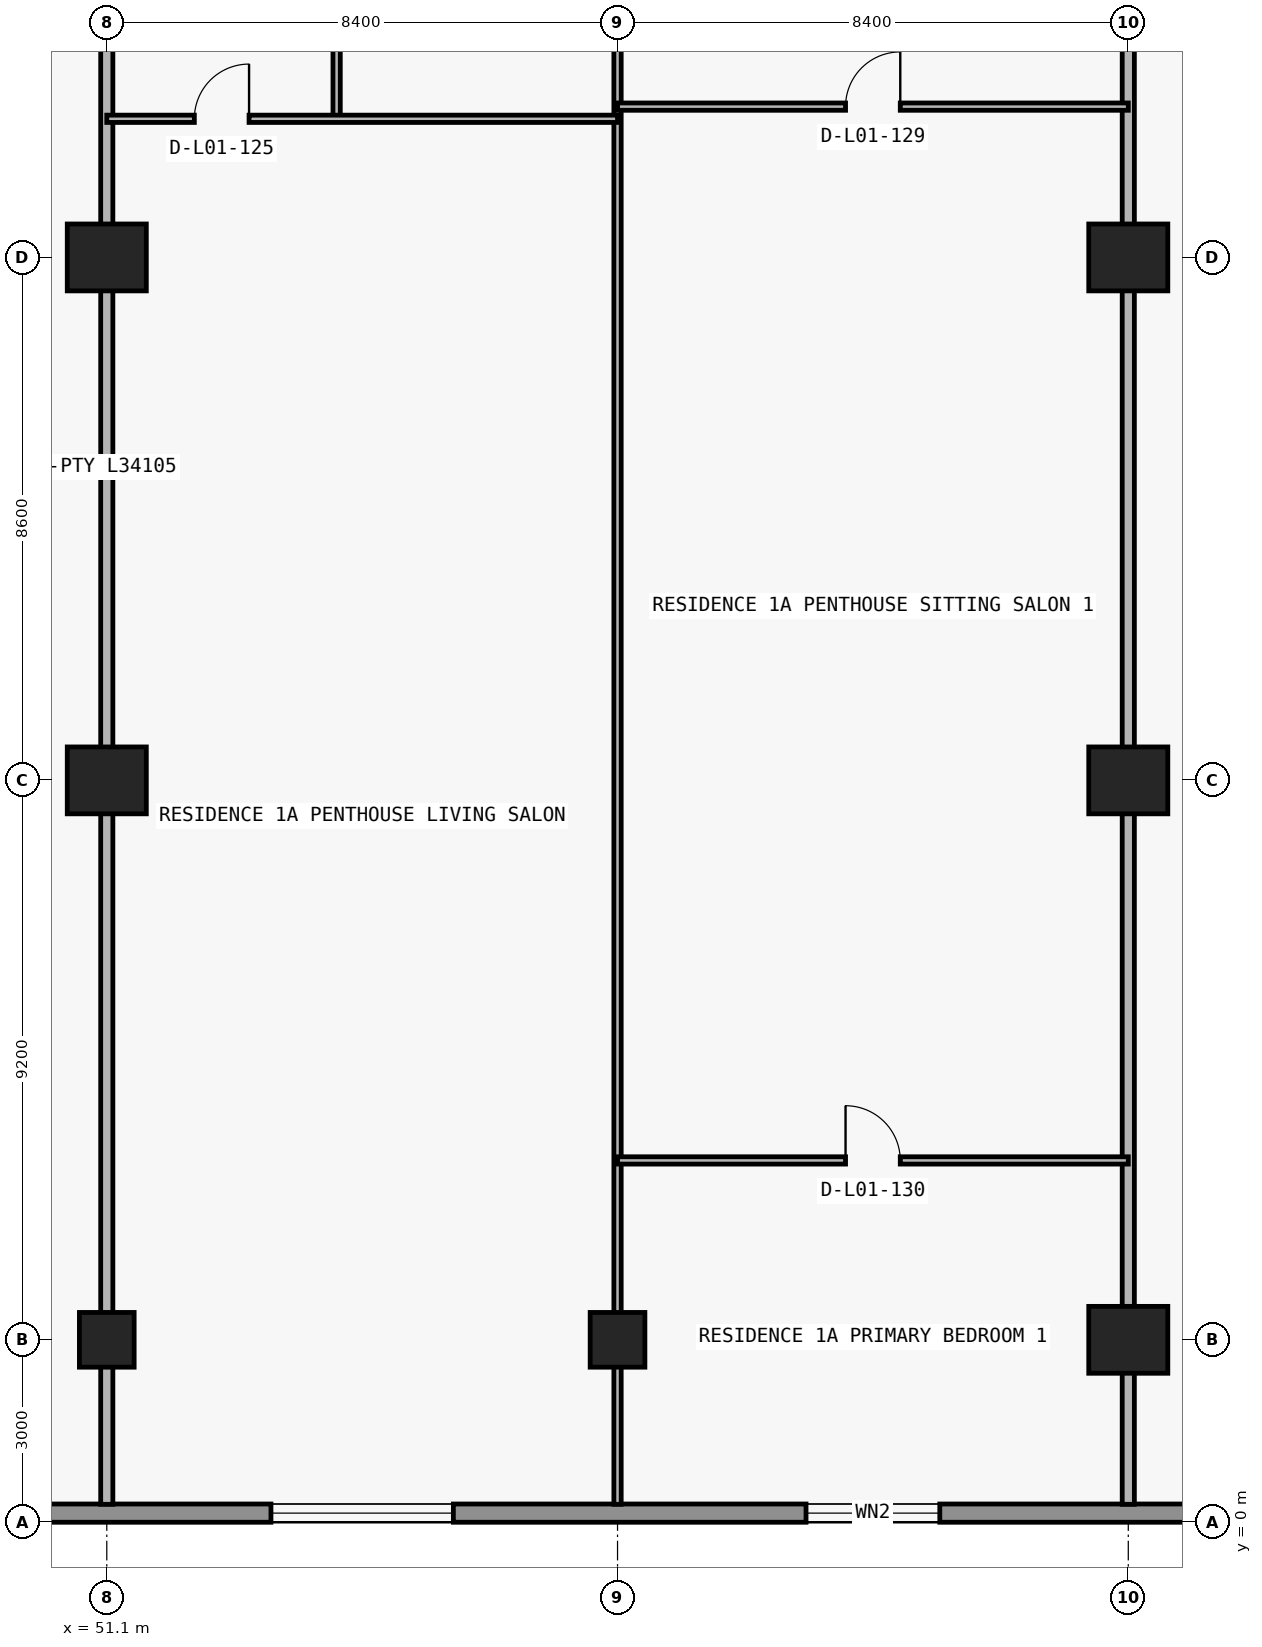
"""IFC4 building model, lengths in metres.
Left out: names, types, materials, properties, quantities, classifications, styles, units other than length and angle.
Written with IfcOpenShell. Run it as: python <this file> out.ifc"""

import sys

from ifc_helpers import new_model, si_unit, direction, frame, frame_2d, origin, origin_2d, place, context, subcontext, project, spatial, rectangle, circle, extrude, element, fill, save


model = new_model("IFC4")
c1 = context("Model", 3, precision=1e-05, world=origin(), true_north=direction((0.0, 1.0)))
c2 = subcontext(c1, "Body", "Model", "MODEL_VIEW")
j1 = project(units=[si_unit("LENGTHUNIT", "METRE"), si_unit("PLANEANGLEUNIT", "RADIAN")], contexts=[c1])
p1 = place(None, origin())
s1 = spatial("IfcSite", under=j1, at=p1, CompositionType="ELEMENT")
p2 = place(p1, origin())
s2 = spatial("IfcBuilding", under=s1, at=p2, CompositionType="ELEMENT")
p3 = place(p2, frame((0.0, 0.0, 5.4)))
s3 = spatial("IfcBuildingStorey", under=s2, at=p3, CompositionType="ELEMENT", Elevation=5.4)
for number, where, z_axis, x_axis in (
    (1, (51.1, 3.0, 0.0), (0.0, 0.0, 1.0), (1.0, 0.0, 0.0)),
    (2, (59.5, 3.0, 0.0), (0.0, 0.0, 1.0), (1.0, 0.0, 0.0)),
):
    element("IfcColumn", number, at=place(p3, frame(where, z_axis=z_axis, x_axis=x_axis)), inside=s3, PredefinedType="COLUMN", context=c2, shape_type="SweptSolid", body=[
        extrude(circle(Radius=0.45, at=origin_2d()), origin(), (0.0, 0.0, 1.0), 4.5),
    ])
for number, where, z_axis, x_axis in (
    (3, (67.9, 3.0, 0.0), (0.0, 0.0, 1.0), (1.0, 0.0, 0.0)),
    (4, (51.1, 12.2, 0.0), (0.0, 0.0, 1.0), (1.0, 0.0, 0.0)),
    (5, (67.9, 12.2, 0.0), (0.0, 0.0, 1.0), (1.0, 0.0, 0.0)),
    (6, (51.1, 20.8, 0.0), (0.0, 0.0, 1.0), (1.0, 0.0, 0.0)),
    (7, (67.9, 20.8, 0.0), (0.0, 0.0, 1.0), (1.0, 0.0, 0.0)),
):
    element("IfcColumn", number, at=place(p3, frame(where, z_axis=z_axis, x_axis=x_axis)), inside=s3, PredefinedType="COLUMN", context=c2, shape_type="SweptSolid", body=[
        extrude(rectangle(XDim=1.3, YDim=1.1, at=origin_2d()), origin(), (0.0, 0.0, 1.0), 4.5),
    ])
p4 = place(p3, frame((77.8, 0.15, 0.0), z_axis=(0.0, 0.0, 1.0), x_axis=(-1.0, 0.0, 0.0)))
e8 = element("IfcWall", 8, at=p4, inside=s3, PredefinedType="STANDARD", context=c2, shape_type="SweptSolid", body=[
    extrude(rectangle(XDim=77.8, YDim=0.3, at=frame_2d((38.9, 0.0))), origin(), (0.0, 0.0, 1.0), 4.5),
])
p5 = place(p4, frame((62.875, 0.0, 0.85)))
e9 = element("IfcOpeningElement", 9, at=p5, cuts=e8, PredefinedType="OPENING", context=c2, shape_type="SweptSolid", body=[
    extrude(rectangle(XDim=3.0, YDim=2.4, at=frame_2d((1.5, 1.2))), frame((0.0, 0.16, 0.0), z_axis=(0.0, -1.0, 0.0), x_axis=(1.0, 0.0, 0.0)), (0.0, 0.0, 1.0), 0.32),
])
p6 = place(p4, frame((37.4, 0.0, 0.85)))
e10 = element("IfcOpeningElement", 10, at=p6, cuts=e8, PredefinedType="OPENING", context=c2, shape_type="SweptSolid", body=[
    extrude(rectangle(XDim=3.0, YDim=2.4, at=frame_2d((1.5, 1.2))), frame((0.0, 0.16, 0.0), z_axis=(0.0, -1.0, 0.0), x_axis=(1.0, 0.0, 0.0)), (0.0, 0.0, 1.0), 0.32),
])
p7 = place(p4, frame((21.0, 0.0, 0.85)))
e11 = element("IfcOpeningElement", 11, at=p7, cuts=e8, PredefinedType="OPENING", context=c2, shape_type="SweptSolid", body=[
    extrude(rectangle(XDim=3.0, YDim=2.4, at=frame_2d((1.5, 1.2))), frame((0.0, 0.16, 0.0), z_axis=(0.0, -1.0, 0.0), x_axis=(1.0, 0.0, 0.0)), (0.0, 0.0, 1.0), 0.32),
])
p8 = place(p4, frame((13.0, 0.0, 0.85)))
e12 = element("IfcOpeningElement", 12, at=p8, cuts=e8, PredefinedType="OPENING", context=c2, shape_type="SweptSolid", body=[
    extrude(rectangle(XDim=2.2, YDim=1.55, at=frame_2d((1.1, 0.775))), frame((0.0, 0.16, 0.0), z_axis=(0.0, -1.0, 0.0), x_axis=(1.0, 0.0, 0.0)), (0.0, 0.0, 1.0), 0.32),
])
p9 = place(p4, frame((3.525, 0.0, 0.85)))
e13 = element("IfcOpeningElement", 13, at=p9, cuts=e8, PredefinedType="OPENING", context=c2, shape_type="SweptSolid", body=[
    extrude(rectangle(XDim=3.0, YDim=2.4, at=frame_2d((1.5, 1.2))), frame((0.0, 0.16, 0.0), z_axis=(0.0, -1.0, 0.0), x_axis=(1.0, 0.0, 0.0)), (0.0, 0.0, 1.0), 0.32),
])
p10 = place(p3, frame((51.1, 0.295, 0.0), z_axis=(0.0, 0.0, 1.0), x_axis=(0.0, 1.0, 0.0)))
e14 = element("IfcWall", 14, at=p10, inside=s3, PredefinedType="PARTITIONING", context=c2, shape_type="SweptSolid", body=[
    extrude(rectangle(XDim=34.105, YDim=0.2, at=frame_2d((17.052, 0.0))), origin(), (0.0, 0.0, 1.0), 3.464),
])
p11 = place(p3, frame((54.88, 23.08, 0.0), z_axis=(0.0, 0.0, 1.0), x_axis=(0.0, 1.0, 0.0)))
e15 = element("IfcWall", 15, at=p11, inside=s3, PredefinedType="PARTITIONING", context=c2, shape_type="SweptSolid", body=[
    extrude(rectangle(XDim=4.8, YDim=0.12, at=frame_2d((2.4, 0.0))), origin(), (0.0, 0.0, 1.0), 4.5),
])
p12 = place(p11, frame((1.95, 0.0, 0.0)))
e16 = element("IfcOpeningElement", 16, at=p12, cuts=e15, PredefinedType="OPENING", context=c2, shape_type="SweptSolid", body=[
    extrude(rectangle(XDim=0.9, YDim=2.15, at=frame_2d((0.45, 1.075))), frame((0.0, 0.07, 0.0), z_axis=(0.0, -1.0, 0.0), x_axis=(1.0, 0.0, 0.0)), (0.0, 0.0, 1.0), 0.14),
])
p13 = place(p3, frame((59.5, 0.295, 0.0), z_axis=(0.0, 0.0, 1.0), x_axis=(0.0, 1.0, 0.0)))
e17 = element("IfcWall", 17, at=p13, inside=s3, PredefinedType="PARTITIONING", context=c2, shape_type="SweptSolid", body=[
    extrude(rectangle(XDim=34.105, YDim=0.12, at=frame_2d((17.052, 0.0))), origin(), (0.0, 0.0, 1.0), 4.5),
])
p14 = place(p13, frame((24.735, 0.0, 0.0)))
e18 = element("IfcOpeningElement", 18, at=p14, cuts=e17, PredefinedType="OPENING", context=c2, shape_type="SweptSolid", body=[
    extrude(rectangle(XDim=0.9, YDim=2.15, at=frame_2d((0.45, 1.075))), frame((0.0, 0.07, 0.0), z_axis=(0.0, -1.0, 0.0), x_axis=(1.0, 0.0, 0.0)), (0.0, 0.0, 1.0), 0.14),
])
p15 = place(p3, frame((67.9, 0.295, 0.0), z_axis=(0.0, 0.0, 1.0), x_axis=(0.0, 1.0, 0.0)))
e19 = element("IfcWall", 19, at=p15, inside=s3, PredefinedType="PARTITIONING", context=c2, shape_type="SweptSolid", body=[
    extrude(rectangle(XDim=34.105, YDim=0.2, at=frame_2d((17.052, 0.0))), origin(), (0.0, 0.0, 1.0), 3.464),
])
p16 = place(p3, frame((59.5, 5.95, 0.0), z_axis=(0.0, 0.0, 1.0), x_axis=(1.0, 0.0, 0.0)))
e20 = element("IfcWall", 20, at=p16, inside=s3, PredefinedType="PARTITIONING", context=c2, shape_type="SweptSolid", body=[
    extrude(rectangle(XDim=8.4, YDim=0.12, at=frame_2d((4.2, 0.0))), origin(), (0.0, 0.0, 1.0), 4.5),
])
p17 = place(p16, frame((3.75, 0.0, 0.0)))
e21 = element("IfcOpeningElement", 21, at=p17, cuts=e20, PredefinedType="OPENING", context=c2, shape_type="SweptSolid", body=[
    extrude(rectangle(XDim=0.9, YDim=2.15, at=frame_2d((0.45, 1.075))), frame((0.0, 0.07, 0.0), z_axis=(0.0, -1.0, 0.0), x_axis=(1.0, 0.0, 0.0)), (0.0, 0.0, 1.0), 0.14),
])
p18 = place(p3, frame((51.1, 23.08, 0.0), z_axis=(0.0, 0.0, 1.0), x_axis=(1.0, 0.0, 0.0)))
e22 = element("IfcWall", 22, at=p18, inside=s3, PredefinedType="PARTITIONING", context=c2, shape_type="SweptSolid", body=[
    extrude(rectangle(XDim=8.4, YDim=0.12, at=frame_2d((4.2, 0.0))), origin(), (0.0, 0.0, 1.0), 4.5),
])
p19 = place(p18, frame((1.44, 0.0, 0.0)))
e23 = element("IfcOpeningElement", 23, at=p19, cuts=e22, PredefinedType="OPENING", context=c2, shape_type="SweptSolid", body=[
    extrude(rectangle(XDim=0.9, YDim=2.15, at=frame_2d((0.45, 1.075))), frame((0.0, 0.07, 0.0), z_axis=(0.0, -1.0, 0.0), x_axis=(1.0, 0.0, 0.0)), (0.0, 0.0, 1.0), 0.14),
])
p20 = place(p3, frame((59.5, 23.28, 0.0), z_axis=(0.0, 0.0, 1.0), x_axis=(1.0, 0.0, 0.0)))
e24 = element("IfcWall", 24, at=p20, inside=s3, PredefinedType="PARTITIONING", context=c2, shape_type="SweptSolid", body=[
    extrude(rectangle(XDim=8.4, YDim=0.12, at=frame_2d((4.2, 0.0))), origin(), (0.0, 0.0, 1.0), 4.5),
])
p21 = place(p20, frame((3.75, 0.0, 0.0)))
e25 = element("IfcOpeningElement", 25, at=p21, cuts=e24, PredefinedType="OPENING", context=c2, shape_type="SweptSolid", body=[
    extrude(rectangle(XDim=0.9, YDim=2.15, at=frame_2d((0.45, 1.075))), frame((0.0, 0.07, 0.0), z_axis=(0.0, -1.0, 0.0), x_axis=(1.0, 0.0, 0.0)), (0.0, 0.0, 1.0), 0.14),
])
p22 = place(p7, origin())
e26 = element("IfcWindow", 26, at=p22, inside=s3, PartitioningType="SINGLE_PANEL", PredefinedType="WINDOW", context=c2, shape_type="SweptSolid", body=[
    extrude(rectangle(XDim=3.0, YDim=2.4, at=frame_2d((1.5, 1.2))), frame((0.0, 0.03, 0.0), z_axis=(0.0, -1.0, 0.0), x_axis=(1.0, 0.0, 0.0)), (0.0, 0.0, 1.0), 0.06),
])
fill(e11, e26)
p23 = place(p8, origin())
e27 = element("IfcWindow", 27, at=p23, inside=s3, PartitioningType="SINGLE_PANEL", PredefinedType="WINDOW", context=c2, shape_type="SweptSolid", body=[
    extrude(rectangle(XDim=2.2, YDim=1.55, at=frame_2d((1.1, 0.775))), frame((0.0, 0.03, 0.0), z_axis=(0.0, -1.0, 0.0), x_axis=(1.0, 0.0, 0.0)), (0.0, 0.0, 1.0), 0.06),
])
fill(e12, e27)
p24 = place(p19, origin())
e28 = element("IfcDoor", 28, at=p24, inside=s3, OperationType="SINGLE_SWING_RIGHT", PredefinedType="DOOR", context=c2, shape_type="SweptSolid", body=[
    extrude(rectangle(XDim=0.9, YDim=2.15, at=frame_2d((0.45, 1.075))), frame((0.0, 0.025, 0.0), z_axis=(0.0, -1.0, 0.0), x_axis=(1.0, 0.0, 0.0)), (0.0, 0.0, 1.0), 0.05),
])
fill(e23, e28)
p25 = place(p21, origin())
e29 = element("IfcDoor", 29, at=p25, inside=s3, OperationType="SINGLE_SWING_RIGHT", PredefinedType="DOOR", context=c2, shape_type="SweptSolid", body=[
    extrude(rectangle(XDim=0.9, YDim=2.15, at=frame_2d((0.45, 1.075))), frame((0.0, 0.025, 0.0), z_axis=(0.0, -1.0, 0.0), x_axis=(1.0, 0.0, 0.0)), (0.0, 0.0, 1.0), 0.05),
])
fill(e25, e29)
p26 = place(p17, origin())
e30 = element("IfcDoor", 30, at=p26, inside=s3, OperationType="SINGLE_SWING_LEFT", PredefinedType="DOOR", context=c2, shape_type="SweptSolid", body=[
    extrude(rectangle(XDim=0.9, YDim=2.15, at=frame_2d((0.45, 1.075))), frame((0.0, 0.025, 0.0), z_axis=(0.0, -1.0, 0.0), x_axis=(1.0, 0.0, 0.0)), (0.0, 0.0, 1.0), 0.05),
])
fill(e21, e30)
save(model, sys.argv[1])
